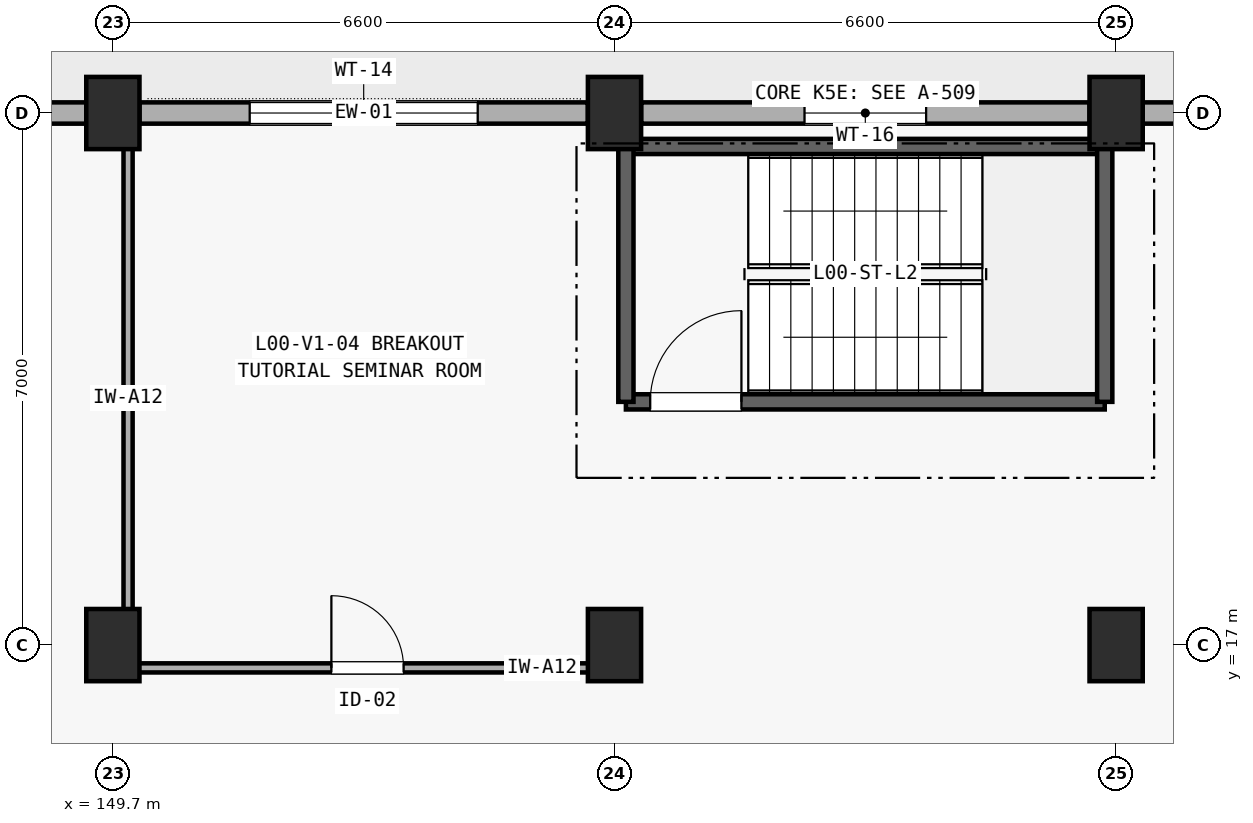
"""IFC4 building model, lengths in metres.
Left out: names, types, materials, properties, quantities, classifications, styles, units other than length and angle.
Written with IfcOpenShell. Run it as: python <this file> out.ifc"""

import sys

from ifc_helpers import new_model, si_unit, direction, frame, frame_2d, origin, origin_2d, place, context, subcontext, project, spatial, rectangle, extrude, element, fill, save


model = new_model("IFC4")
c1 = context("Model", 3, precision=1e-05, world=origin(), true_north=direction((0.0, 1.0)))
c2 = subcontext(c1, "Body", "Model", "MODEL_VIEW")
j1 = project(units=[si_unit("LENGTHUNIT", "METRE"), si_unit("PLANEANGLEUNIT", "RADIAN")], contexts=[c1])
p1 = place(None, origin())
s1 = spatial("IfcSite", under=j1, at=p1, CompositionType="ELEMENT")
p2 = place(p1, origin())
s2 = spatial("IfcBuilding", under=s1, at=p2, CompositionType="ELEMENT")
p3 = place(p2, origin())
s3 = spatial("IfcBuildingStorey", under=s2, at=p3, CompositionType="ELEMENT", Elevation=0.0)
for number, where, z_axis, x_axis in (
    (1, (149.7, 17.0, 0.0), (0.0, 0.0, 1.0), (1.0, 0.0, 0.0)),
    (2, (149.7, 24.0, 0.0), (0.0, 0.0, 1.0), (1.0, 0.0, 0.0)),
    (3, (156.3, 17.0, 0.0), (0.0, 0.0, 1.0), (1.0, 0.0, 0.0)),
    (4, (156.3, 24.0, 0.0), (0.0, 0.0, 1.0), (1.0, 0.0, 0.0)),
    (5, (162.9, 17.0, 0.0), (0.0, 0.0, 1.0), (1.0, 0.0, 0.0)),
    (6, (162.9, 24.0, 0.0), (0.0, 0.0, 1.0), (1.0, 0.0, 0.0)),
):
    element("IfcColumn", number, at=place(p3, frame(where, z_axis=z_axis, x_axis=x_axis)), inside=s3, PredefinedType="COLUMN", context=c2, shape_type="SweptSolid", body=[
        extrude(rectangle(XDim=0.7, YDim=0.95, at=origin_2d()), origin(), (0.0, 0.0, 1.0), 4.2),
    ])
p4 = place(p3, frame((143.45, 24.0, 0.0), z_axis=(0.0, 0.0, 1.0), x_axis=(1.0, 0.0, 0.0)))
e7 = element("IfcWall", 7, at=p4, inside=s3, PredefinedType="SOLIDWALL", context=c2, shape_type="SweptSolid", body=[
    extrude(rectangle(XDim=5.9, YDim=0.28, at=frame_2d((2.95, 0.0))), origin(), (0.0, 0.0, 1.0), 3.135),
])
p5 = place(p4, frame((1.85, 0.0, 0.0)))
e8 = element("IfcOpeningElement", 8, at=p5, cuts=e7, PredefinedType="OPENING", context=c2, shape_type="SweptSolid", body=[
    extrude(rectangle(XDim=2.2, YDim=2.2, at=frame_2d((1.1, 1.1))), frame((0.0, 0.15, 0.0), z_axis=(0.0, -1.0, 0.0), x_axis=(1.0, 0.0, 0.0)), (0.0, 0.0, 1.0), 0.3),
])
p6 = place(p3, frame((150.05, 24.0, 0.0), z_axis=(0.0, 0.0, 1.0), x_axis=(1.0, 0.0, 0.0)))
e9 = element("IfcWall", 9, at=p6, inside=s3, PredefinedType="SOLIDWALL", context=c2, shape_type="SweptSolid", body=[
    extrude(rectangle(XDim=5.9, YDim=0.28, at=frame_2d((2.95, 0.0))), origin(), (0.0, 0.0, 1.0), 3.235),
])
p7 = place(p6, frame((1.45, 0.0, 0.85)))
e10 = element("IfcOpeningElement", 10, at=p7, cuts=e9, PredefinedType="OPENING", context=c2, shape_type="SweptSolid", body=[
    extrude(rectangle(XDim=3.0, YDim=1.5, at=frame_2d((1.5, 0.75))), frame((0.0, 0.15, 0.0), z_axis=(0.0, -1.0, 0.0), x_axis=(1.0, 0.0, 0.0)), (0.0, 0.0, 1.0), 0.3),
])
p8 = place(p3, frame((156.65, 24.0, 0.0), z_axis=(0.0, 0.0, 1.0), x_axis=(1.0, 0.0, 0.0)))
e11 = element("IfcWall", 11, at=p8, inside=s3, PredefinedType="SOLIDWALL", context=c2, shape_type="SweptSolid", body=[
    extrude(rectangle(XDim=5.9, YDim=0.28, at=frame_2d((2.95, 0.0))), origin(), (0.0, 0.0, 1.0), 3.235),
])
p9 = place(p8, frame((2.15, 0.0, 0.85)))
e12 = element("IfcOpeningElement", 12, at=p9, cuts=e11, PredefinedType="OPENING", context=c2, shape_type="SweptSolid", body=[
    extrude(rectangle(XDim=1.6, YDim=1.25, at=frame_2d((0.8, 0.625))), frame((0.0, 0.15, 0.0), z_axis=(0.0, -1.0, 0.0), x_axis=(1.0, 0.0, 0.0)), (0.0, 0.0, 1.0), 0.3),
])
p10 = place(p3, frame((163.25, 24.0, 0.0), z_axis=(0.0, 0.0, 1.0), x_axis=(1.0, 0.0, 0.0)))
e13 = element("IfcWall", 13, at=p10, inside=s3, PredefinedType="SOLIDWALL", context=c2, shape_type="SweptSolid", body=[
    extrude(rectangle(XDim=5.9, YDim=0.28, at=frame_2d((2.95, 0.0))), origin(), (0.0, 0.0, 1.0), 3.285),
])
p11 = place(p10, frame((2.0, 0.0, 0.0)))
e14 = element("IfcOpeningElement", 14, at=p11, cuts=e13, PredefinedType="OPENING", context=c2, shape_type="SweptSolid", body=[
    extrude(rectangle(XDim=1.9, YDim=2.2, at=frame_2d((0.95, 1.1))), frame((0.0, 0.15, 0.0), z_axis=(0.0, -1.0, 0.0), x_axis=(1.0, 0.0, 0.0)), (0.0, 0.0, 1.0), 0.3),
])
p12 = place(p3, frame((156.45, 20.2, 0.0), z_axis=(0.0, 0.0, 1.0), x_axis=(1.0, 0.0, 0.0)))
e15 = element("IfcWall", 15, at=p12, inside=s3, PredefinedType="SHEAR", context=c2, shape_type="SweptSolid", body=[
    extrude(rectangle(XDim=6.3, YDim=0.2, at=frame_2d((3.15, 0.0))), origin(), (0.0, 0.0, 1.0), 4.2),
])
p13 = place(p12, frame((0.32, 0.0, 0.0)))
e16 = element("IfcOpeningElement", 16, at=p13, cuts=e15, PredefinedType="OPENING", context=c2, shape_type="SweptSolid", body=[
    extrude(rectangle(XDim=1.2, YDim=2.15, at=frame_2d((0.6, 1.075))), frame((0.0, 0.11, 0.0), z_axis=(0.0, -1.0, 0.0), x_axis=(1.0, 0.0, 0.0)), (0.0, 0.0, 1.0), 0.22),
])
p14 = place(p3, frame((156.45, 23.56, 0.0), z_axis=(0.0, 0.0, 1.0), x_axis=(1.0, 0.0, 0.0)))
e17 = element("IfcWall", 17, at=p14, inside=s3, PredefinedType="SHEAR", context=c2, shape_type="SweptSolid", body=[
    extrude(rectangle(XDim=6.3, YDim=0.2, at=frame_2d((3.15, 0.0))), origin(), (0.0, 0.0, 1.0), 4.2),
])
for number, where, z_axis, x_axis in (
    (18, (156.45, 20.2, 0.0), (0.0, 0.0, 1.0), (0.0, 1.0, 0.0)),
    (19, (162.75, 20.2, 0.0), (0.0, 0.0, 1.0), (0.0, 1.0, 0.0)),
):
    element("IfcWall", number, at=place(p3, frame(where, z_axis=z_axis, x_axis=x_axis)), inside=s3, PredefinedType="SHEAR", context=c2, shape_type="SweptSolid", body=[
        extrude(rectangle(XDim=3.36, YDim=0.2, at=frame_2d((1.68, 0.0))), origin(), (0.0, 0.0, 1.0), 4.2),
    ])
p15 = place(p3, frame((149.9, 16.7, 0.0), z_axis=(0.0, 0.0, 1.0), x_axis=(1.0, 0.0, 0.0)))
e20 = element("IfcWall", 20, at=p15, inside=s3, PredefinedType="PARTITIONING", context=c2, shape_type="SweptSolid", body=[
    extrude(rectangle(XDim=6.3, YDim=0.12, at=frame_2d((3.15, 0.0))), origin(), (0.0, 0.0, 1.0), 3.235),
])
p16 = place(p15, frame((2.675, 0.0, 0.0)))
e21 = element("IfcOpeningElement", 21, at=p16, cuts=e20, PredefinedType="OPENING", context=c2, shape_type="SweptSolid", body=[
    extrude(rectangle(XDim=0.95, YDim=2.1, at=frame_2d((0.475, 1.05))), frame((0.0, 0.07, 0.0), z_axis=(0.0, -1.0, 0.0), x_axis=(1.0, 0.0, 0.0)), (0.0, 0.0, 1.0), 0.14),
])
p17 = place(p3, frame((149.9, 16.7, 0.0), z_axis=(0.0, 0.0, 1.0), x_axis=(0.0, 1.0, 0.0)))
e22 = element("IfcWall", 22, at=p17, inside=s3, PredefinedType="PARTITIONING", context=c2, shape_type="SweptSolid", body=[
    extrude(rectangle(XDim=7.1, YDim=0.12, at=frame_2d((3.55, 0.0))), origin(), (0.0, 0.0, 1.0), 3.405),
])
p18 = place(p7, origin())
e23 = element("IfcWindow", 23, at=p18, inside=s3, PartitioningType="SINGLE_PANEL", PredefinedType="WINDOW", context=c2, shape_type="SweptSolid", body=[
    extrude(rectangle(XDim=3.0, YDim=1.5, at=frame_2d((1.5, 0.75))), frame((0.0, 0.03, 0.0), z_axis=(0.0, -1.0, 0.0), x_axis=(1.0, 0.0, 0.0)), (0.0, 0.0, 1.0), 0.06),
])
fill(e10, e23)
p19 = place(p9, origin())
e24 = element("IfcWindow", 24, at=p19, inside=s3, PartitioningType="SINGLE_PANEL", PredefinedType="WINDOW", context=c2, shape_type="SweptSolid", body=[
    extrude(rectangle(XDim=1.6, YDim=1.25, at=frame_2d((0.8, 0.625))), frame((0.0, 0.03, 0.0), z_axis=(0.0, -1.0, 0.0), x_axis=(1.0, 0.0, 0.0)), (0.0, 0.0, 1.0), 0.06),
])
fill(e12, e24)
p20 = place(p13, origin())
e25 = element("IfcDoor", 25, at=p20, inside=s3, OperationType="SINGLE_SWING_RIGHT", PredefinedType="DOOR", context=c2, shape_type="SweptSolid", body=[
    extrude(rectangle(XDim=1.2, YDim=2.15, at=frame_2d((0.6, 1.075))), frame((0.0, 0.025, 0.0), z_axis=(0.0, -1.0, 0.0), x_axis=(1.0, 0.0, 0.0)), (0.0, 0.0, 1.0), 0.05),
])
fill(e16, e25)
p21 = place(p16, origin())
e26 = element("IfcDoor", 26, at=p21, inside=s3, OperationType="SINGLE_SWING_LEFT", PredefinedType="DOOR", context=c2, shape_type="SweptSolid", body=[
    extrude(rectangle(XDim=0.95, YDim=2.1, at=frame_2d((0.475, 1.05))), frame((0.0, 0.025, 0.0), z_axis=(0.0, -1.0, 0.0), x_axis=(1.0, 0.0, 0.0)), (0.0, 0.0, 1.0), 0.05),
])
fill(e21, e26)
save(model, sys.argv[1])
